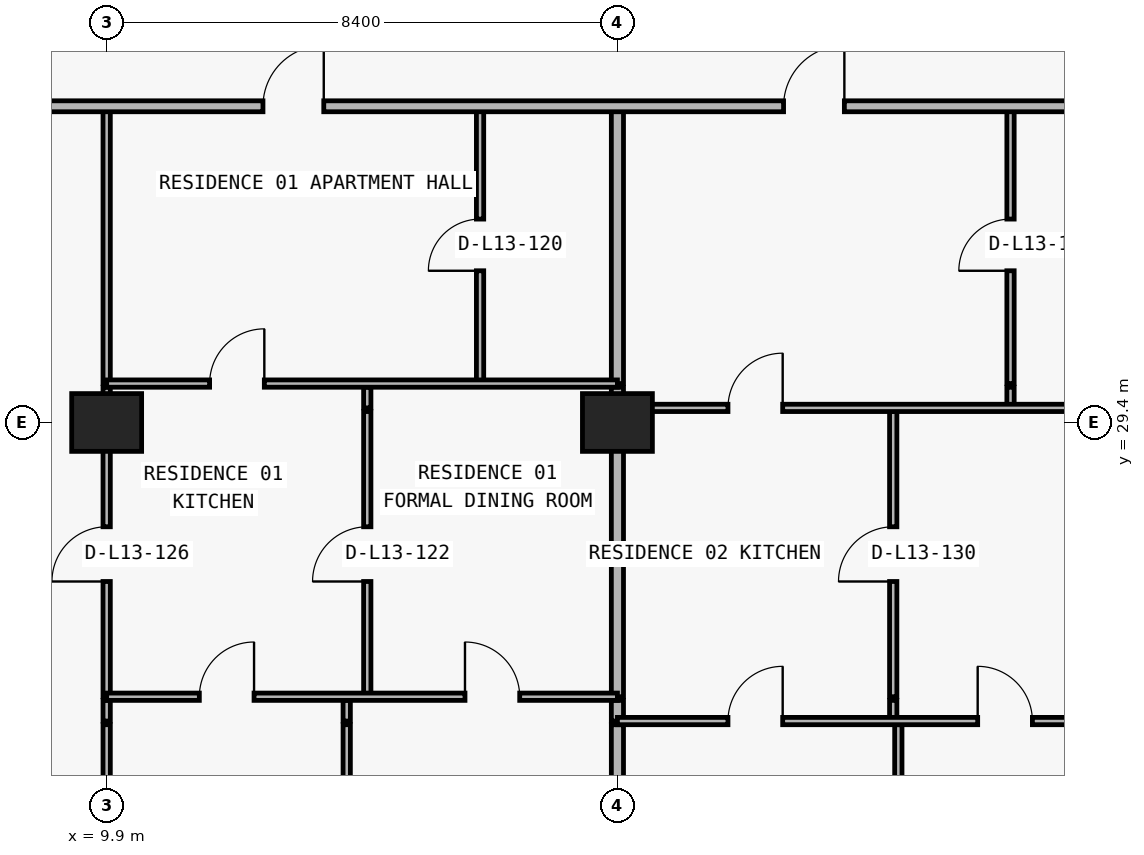
"""IFC4 building model, lengths in metres.
Left out: names, types, materials, properties, quantities, classifications, styles, units other than length and angle.
Written with IfcOpenShell. Run it as: python <this file> out.ifc"""

import sys

from ifc_helpers import new_model, si_unit, direction, frame, frame_2d, origin, origin_2d, place, context, subcontext, project, spatial, rectangle, extrude, element, fill, save


model = new_model("IFC4")
c1 = context("Model", 3, precision=1e-05, world=origin(), true_north=direction((0.0, 1.0)))
c2 = subcontext(c1, "Body", "Model", "MODEL_VIEW")
j1 = project(units=[si_unit("LENGTHUNIT", "METRE"), si_unit("PLANEANGLEUNIT", "RADIAN")], contexts=[c1])
p1 = place(None, origin())
s1 = spatial("IfcSite", under=j1, at=p1, CompositionType="ELEMENT")
p2 = place(p1, origin())
s2 = spatial("IfcBuilding", under=s1, at=p2, CompositionType="ELEMENT")
p3 = place(p2, frame((0.0, 0.0, 53.1)))
s3 = spatial("IfcBuildingStorey", under=s2, at=p3, CompositionType="ELEMENT", Elevation=53.1)
for number, where, z_axis, x_axis in (
    (1, (9.9, 29.4, 0.0), (0.0, 0.0, 1.0), (1.0, 0.0, 0.0)),
    (2, (18.3, 29.4, 0.0), (0.0, 0.0, 1.0), (1.0, 0.0, 0.0)),
):
    element("IfcColumn", number, at=place(p3, frame(where, z_axis=z_axis, x_axis=x_axis)), inside=s3, PredefinedType="COLUMN", context=c2, shape_type="SweptSolid", body=[
        extrude(rectangle(XDim=1.15, YDim=0.95, at=origin_2d()), origin(), (0.0, 0.0, 1.0), 3.05),
    ])
p4 = place(p3, frame((9.9, 6.24, 0.0), z_axis=(0.0, 0.0, 1.0), x_axis=(0.0, 1.0, 0.0)))
e3 = element("IfcWall", 3, at=p4, inside=s3, PredefinedType="PARTITIONING", context=c2, shape_type="SweptSolid", body=[
    extrude(rectangle(XDim=18.19, YDim=0.12, at=frame_2d((9.095, 0.0))), origin(), (0.0, 0.0, 1.0), 2.11),
])
p5 = place(p3, frame((9.9, 24.49, 0.0), z_axis=(0.0, 0.0, 1.0), x_axis=(0.0, 1.0, 0.0)))
e4 = element("IfcWall", 4, at=p5, inside=s3, PredefinedType="PARTITIONING", context=c2, shape_type="SweptSolid", body=[
    extrude(rectangle(XDim=0.34, YDim=0.12, at=frame_2d((0.17, 0.0))), origin(), (0.0, 0.0, 1.0), 2.11),
])
p6 = place(p3, frame((9.9, 24.89, 0.0), z_axis=(0.0, 0.0, 1.0), x_axis=(0.0, 1.0, 0.0)))
e5 = element("IfcWall", 5, at=p6, inside=s3, PredefinedType="PARTITIONING", context=c2, shape_type="SweptSolid", body=[
    extrude(rectangle(XDim=4.69, YDim=0.12, at=frame_2d((2.345, 0.0))), origin(), (0.0, 0.0, 1.0), 2.11),
])
p7 = place(p6, frame((1.895, 0.0, 0.0)))
e6 = element("IfcOpeningElement", 6, at=p7, cuts=e5, PredefinedType="OPENING", context=c2, shape_type="SweptSolid", body=[
    extrude(rectangle(XDim=0.9, YDim=2.06, at=frame_2d((0.45, 1.03))), frame((0.0, 0.07, 0.0), z_axis=(0.0, -1.0, 0.0), x_axis=(1.0, 0.0, 0.0)), (0.0, 0.0, 1.0), 0.14),
])
p8 = place(p3, frame((9.9, 29.64, 0.0), z_axis=(0.0, 0.0, 1.0), x_axis=(0.0, 1.0, 0.0)))
e7 = element("IfcWall", 7, at=p8, inside=s3, PredefinedType="PARTITIONING", context=c2, shape_type="SweptSolid", body=[
    extrude(rectangle(XDim=0.34, YDim=0.12, at=frame_2d((0.17, 0.0))), origin(), (0.0, 0.0, 1.0), 2.11),
])
p9 = place(p3, frame((9.9, 30.04, 0.0), z_axis=(0.0, 0.0, 1.0), x_axis=(0.0, 1.0, 0.0)))
e8 = element("IfcWall", 8, at=p9, inside=s3, PredefinedType="PARTITIONING", context=c2, shape_type="SweptSolid", body=[
    extrude(rectangle(XDim=4.56, YDim=0.12, at=frame_2d((2.28, 0.0))), origin(), (0.0, 0.0, 1.0), 2.11),
])
p10 = place(p3, frame((13.848, 6.24, 0.0), z_axis=(0.0, 0.0, 1.0), x_axis=(0.0, 1.0, 0.0)))
e9 = element("IfcWall", 9, at=p10, inside=s3, PredefinedType="PARTITIONING", context=c2, shape_type="SweptSolid", body=[
    extrude(rectangle(XDim=18.19, YDim=0.12, at=frame_2d((9.095, 0.0))), origin(), (0.0, 0.0, 1.0), 2.423),
])
p11 = place(p3, frame((13.848, 24.49, 0.0), z_axis=(0.0, 0.0, 1.0), x_axis=(0.0, 1.0, 0.0)))
e10 = element("IfcWall", 10, at=p11, inside=s3, PredefinedType="PARTITIONING", context=c2, shape_type="SweptSolid", body=[
    extrude(rectangle(XDim=0.34, YDim=0.12, at=frame_2d((0.17, 0.0))), origin(), (0.0, 0.0, 1.0), 2.423),
])
p12 = place(p3, frame((14.186, 24.89, 0.0), z_axis=(0.0, 0.0, 1.0), x_axis=(0.0, 1.0, 0.0)))
e11 = element("IfcWall", 11, at=p12, inside=s3, PredefinedType="PARTITIONING", context=c2, shape_type="SweptSolid", body=[
    extrude(rectangle(XDim=4.69, YDim=0.12, at=frame_2d((2.345, 0.0))), origin(), (0.0, 0.0, 1.0), 2.423),
])
p13 = place(p12, frame((1.895, 0.0, 0.0)))
e12 = element("IfcOpeningElement", 12, at=p13, cuts=e11, PredefinedType="OPENING", context=c2, shape_type="SweptSolid", body=[
    extrude(rectangle(XDim=0.9, YDim=2.15, at=frame_2d((0.45, 1.075))), frame((0.0, 0.07, 0.0), z_axis=(0.0, -1.0, 0.0), x_axis=(1.0, 0.0, 0.0)), (0.0, 0.0, 1.0), 0.14),
])
p14 = place(p3, frame((14.186, 29.64, 0.0), z_axis=(0.0, 0.0, 1.0), x_axis=(0.0, 1.0, 0.0)))
e13 = element("IfcWall", 13, at=p14, inside=s3, PredefinedType="PARTITIONING", context=c2, shape_type="SweptSolid", body=[
    extrude(rectangle(XDim=0.34, YDim=0.12, at=frame_2d((0.17, 0.0))), origin(), (0.0, 0.0, 1.0), 2.423),
])
p15 = place(p3, frame((16.041, 30.04, 0.0), z_axis=(0.0, 0.0, 1.0), x_axis=(0.0, 1.0, 0.0)))
e14 = element("IfcWall", 14, at=p15, inside=s3, PredefinedType="PARTITIONING", context=c2, shape_type="SweptSolid", body=[
    extrude(rectangle(XDim=4.56, YDim=0.12, at=frame_2d((2.28, 0.0))), origin(), (0.0, 0.0, 1.0), 3.05),
])
p16 = place(p15, frame((1.855, 0.0, 0.0)))
e15 = element("IfcOpeningElement", 15, at=p16, cuts=e14, PredefinedType="OPENING", context=c2, shape_type="SweptSolid", body=[
    extrude(rectangle(XDim=0.85, YDim=2.1, at=frame_2d((0.425, 1.05))), frame((0.0, 0.07, 0.0), z_axis=(0.0, -1.0, 0.0), x_axis=(1.0, 0.0, 0.0)), (0.0, 0.0, 1.0), 0.14),
])
p17 = place(p3, frame((18.3, 6.24, 0.0), z_axis=(0.0, 0.0, 1.0), x_axis=(0.0, 1.0, 0.0)))
e16 = element("IfcWall", 16, at=p17, inside=s3, PredefinedType="PARTITIONING", context=c2, shape_type="SweptSolid", body=[
    extrude(rectangle(XDim=18.19, YDim=0.2, at=frame_2d((9.095, 0.0))), origin(), (0.0, 0.0, 1.0), 2.11),
])
p18 = place(p3, frame((18.3, 24.49, 0.0), z_axis=(0.0, 0.0, 1.0), x_axis=(0.0, 1.0, 0.0)))
e17 = element("IfcWall", 17, at=p18, inside=s3, PredefinedType="PARTITIONING", context=c2, shape_type="SweptSolid", body=[
    extrude(rectangle(XDim=0.34, YDim=0.2, at=frame_2d((0.17, 0.0))), origin(), (0.0, 0.0, 1.0), 2.11),
])
p19 = place(p3, frame((18.3, 24.89, 0.0), z_axis=(0.0, 0.0, 1.0), x_axis=(0.0, 1.0, 0.0)))
e18 = element("IfcWall", 18, at=p19, inside=s3, PredefinedType="PARTITIONING", context=c2, shape_type="SweptSolid", body=[
    extrude(rectangle(XDim=4.69, YDim=0.2, at=frame_2d((2.345, 0.0))), origin(), (0.0, 0.0, 1.0), 2.11),
])
p20 = place(p3, frame((18.3, 29.64, 0.0), z_axis=(0.0, 0.0, 1.0), x_axis=(0.0, 1.0, 0.0)))
e19 = element("IfcWall", 19, at=p20, inside=s3, PredefinedType="PARTITIONING", context=c2, shape_type="SweptSolid", body=[
    extrude(rectangle(XDim=0.34, YDim=0.2, at=frame_2d((0.17, 0.0))), origin(), (0.0, 0.0, 1.0), 2.11),
])
p21 = place(p3, frame((18.3, 30.04, 0.0), z_axis=(0.0, 0.0, 1.0), x_axis=(0.0, 1.0, 0.0)))
e20 = element("IfcWall", 20, at=p21, inside=s3, PredefinedType="PARTITIONING", context=c2, shape_type="SweptSolid", body=[
    extrude(rectangle(XDim=4.56, YDim=0.2, at=frame_2d((2.28, 0.0))), origin(), (0.0, 0.0, 1.0), 2.11),
])
p22 = place(p3, frame((22.836, 24.49, 0.0), z_axis=(0.0, 0.0, 1.0), x_axis=(0.0, 1.0, 0.0)))
e21 = element("IfcWall", 21, at=p22, inside=s3, PredefinedType="PARTITIONING", context=c2, shape_type="SweptSolid", body=[
    extrude(rectangle(XDim=0.34, YDim=0.12, at=frame_2d((0.17, 0.0))), origin(), (0.0, 0.0, 1.0), 3.05),
])
p23 = place(p3, frame((22.836, 24.89, 0.0), z_axis=(0.0, 0.0, 1.0), x_axis=(0.0, 1.0, 0.0)))
e22 = element("IfcWall", 22, at=p23, inside=s3, PredefinedType="PARTITIONING", context=c2, shape_type="SweptSolid", body=[
    extrude(rectangle(XDim=4.69, YDim=0.12, at=frame_2d((2.345, 0.0))), origin(), (0.0, 0.0, 1.0), 3.05),
])
p24 = place(p23, frame((1.895, 0.0, 0.0)))
e23 = element("IfcOpeningElement", 23, at=p24, cuts=e22, PredefinedType="OPENING", context=c2, shape_type="SweptSolid", body=[
    extrude(rectangle(XDim=0.9, YDim=2.15, at=frame_2d((0.45, 1.075))), frame((0.0, 0.07, 0.0), z_axis=(0.0, -1.0, 0.0), x_axis=(1.0, 0.0, 0.0)), (0.0, 0.0, 1.0), 0.14),
])
p25 = place(p3, frame((22.92, 6.24, 0.0), z_axis=(0.0, 0.0, 1.0), x_axis=(0.0, 1.0, 0.0)))
e24 = element("IfcWall", 24, at=p25, inside=s3, PredefinedType="PARTITIONING", context=c2, shape_type="SweptSolid", body=[
    extrude(rectangle(XDim=18.19, YDim=0.12, at=frame_2d((9.095, 0.0))), origin(), (0.0, 0.0, 1.0), 3.05),
])
p26 = place(p3, frame((24.765, 29.64, 0.0), z_axis=(0.0, 0.0, 1.0), x_axis=(0.0, 1.0, 0.0)))
e25 = element("IfcWall", 25, at=p26, inside=s3, PredefinedType="PARTITIONING", context=c2, shape_type="SweptSolid", body=[
    extrude(rectangle(XDim=0.34, YDim=0.12, at=frame_2d((0.17, 0.0))), origin(), (0.0, 0.0, 1.0), 3.05),
])
p27 = place(p3, frame((24.765, 30.04, 0.0), z_axis=(0.0, 0.0, 1.0), x_axis=(0.0, 1.0, 0.0)))
e26 = element("IfcWall", 26, at=p27, inside=s3, PredefinedType="PARTITIONING", context=c2, shape_type="SweptSolid", body=[
    extrude(rectangle(XDim=4.56, YDim=0.12, at=frame_2d((2.28, 0.0))), origin(), (0.0, 0.0, 1.0), 3.05),
])
p28 = place(p27, frame((1.855, 0.0, 0.0)))
e27 = element("IfcOpeningElement", 27, at=p28, cuts=e26, PredefinedType="OPENING", context=c2, shape_type="SweptSolid", body=[
    extrude(rectangle(XDim=0.85, YDim=2.1, at=frame_2d((0.425, 1.05))), frame((0.0, 0.07, 0.0), z_axis=(0.0, -1.0, 0.0), x_axis=(1.0, 0.0, 0.0)), (0.0, 0.0, 1.0), 0.14),
])
p29 = place(p3, frame((18.3, 24.49, 0.0), z_axis=(0.0, 0.0, 1.0), x_axis=(1.0, 0.0, 0.0)))
e28 = element("IfcWall", 28, at=p29, inside=s3, PredefinedType="PARTITIONING", context=c2, shape_type="SweptSolid", body=[
    extrude(rectangle(XDim=8.13, YDim=0.12, at=frame_2d((4.065, 0.0))), origin(), (0.0, 0.0, 1.0), 3.05),
])
p30 = place(p29, frame((1.818, 0.0, 0.0)))
e29 = element("IfcOpeningElement", 29, at=p30, cuts=e28, PredefinedType="OPENING", context=c2, shape_type="SweptSolid", body=[
    extrude(rectangle(XDim=0.9, YDim=2.15, at=frame_2d((0.45, 1.075))), frame((0.0, 0.07, 0.0), z_axis=(0.0, -1.0, 0.0), x_axis=(1.0, 0.0, 0.0)), (0.0, 0.0, 1.0), 0.14),
])
p31 = place(p29, frame((5.925, 0.0, 0.0)))
e30 = element("IfcOpeningElement", 30, at=p31, cuts=e28, PredefinedType="OPENING", context=c2, shape_type="SweptSolid", body=[
    extrude(rectangle(XDim=0.9, YDim=2.15, at=frame_2d((0.45, 1.075))), frame((0.0, 0.07, 0.0), z_axis=(0.0, -1.0, 0.0), x_axis=(1.0, 0.0, 0.0)), (0.0, 0.0, 1.0), 0.14),
])
p32 = place(p3, frame((9.9, 24.89, 0.0), z_axis=(0.0, 0.0, 1.0), x_axis=(1.0, 0.0, 0.0)))
e31 = element("IfcWall", 31, at=p32, inside=s3, PredefinedType="PARTITIONING", context=c2, shape_type="SweptSolid", body=[
    extrude(rectangle(XDim=8.4, YDim=0.12, at=frame_2d((4.2, 0.0))), origin(), (0.0, 0.0, 1.0), 3.05),
])
p33 = place(p32, frame((1.524, 0.0, 0.0)))
e32 = element("IfcOpeningElement", 32, at=p33, cuts=e31, PredefinedType="OPENING", context=c2, shape_type="SweptSolid", body=[
    extrude(rectangle(XDim=0.9, YDim=2.15, at=frame_2d((0.45, 1.075))), frame((0.0, 0.07, 0.0), z_axis=(0.0, -1.0, 0.0), x_axis=(1.0, 0.0, 0.0)), (0.0, 0.0, 1.0), 0.14),
])
p34 = place(p32, frame((5.893, 0.0, 0.0)))
e33 = element("IfcOpeningElement", 33, at=p34, cuts=e31, PredefinedType="OPENING", context=c2, shape_type="SweptSolid", body=[
    extrude(rectangle(XDim=0.9, YDim=2.15, at=frame_2d((0.45, 1.075))), frame((0.0, 0.07, 0.0), z_axis=(0.0, -1.0, 0.0), x_axis=(1.0, 0.0, 0.0)), (0.0, 0.0, 1.0), 0.14),
])
p35 = place(p3, frame((18.3, 29.64, 0.0), z_axis=(0.0, 0.0, 1.0), x_axis=(1.0, 0.0, 0.0)))
e34 = element("IfcWall", 34, at=p35, inside=s3, PredefinedType="PARTITIONING", context=c2, shape_type="SweptSolid", body=[
    extrude(rectangle(XDim=8.4, YDim=0.12, at=frame_2d((4.2, 0.0))), origin(), (0.0, 0.0, 1.0), 2.11),
])
p36 = place(p35, frame((1.818, 0.0, 0.0)))
e35 = element("IfcOpeningElement", 35, at=p36, cuts=e34, PredefinedType="OPENING", context=c2, shape_type="SweptSolid", body=[
    extrude(rectangle(XDim=0.9, YDim=2.06, at=frame_2d((0.45, 1.03))), frame((0.0, 0.07, 0.0), z_axis=(0.0, -1.0, 0.0), x_axis=(1.0, 0.0, 0.0)), (0.0, 0.0, 1.0), 0.14),
])
p37 = place(p3, frame((9.9, 30.04, 0.0), z_axis=(0.0, 0.0, 1.0), x_axis=(1.0, 0.0, 0.0)))
e36 = element("IfcWall", 36, at=p37, inside=s3, PredefinedType="PARTITIONING", context=c2, shape_type="SweptSolid", body=[
    extrude(rectangle(XDim=8.4, YDim=0.12, at=frame_2d((4.2, 0.0))), origin(), (0.0, 0.0, 1.0), 3.05),
])
p38 = place(p37, frame((1.693, 0.0, 0.0)))
e37 = element("IfcOpeningElement", 37, at=p38, cuts=e36, PredefinedType="OPENING", context=c2, shape_type="SweptSolid", body=[
    extrude(rectangle(XDim=0.9, YDim=2.15, at=frame_2d((0.45, 1.075))), frame((0.0, 0.07, 0.0), z_axis=(0.0, -1.0, 0.0), x_axis=(1.0, 0.0, 0.0)), (0.0, 0.0, 1.0), 0.14),
])
p39 = place(p3, frame((5.105, 34.6, 0.0), z_axis=(0.0, 0.0, 1.0), x_axis=(1.0, 0.0, 0.0)))
e38 = element("IfcWall", 38, at=p39, inside=s3, PredefinedType="PARTITIONING", context=c2, shape_type="SweptSolid", body=[
    extrude(rectangle(XDim=67.595, YDim=0.18, at=frame_2d((33.797, 0.0))), origin(), (0.0, 0.0, 1.0), 3.05),
])
p40 = place(p39, frame((7.365, 0.0, 0.0)))
e39 = element("IfcOpeningElement", 39, at=p40, cuts=e38, PredefinedType="OPENING", context=c2, shape_type="SweptSolid", body=[
    extrude(rectangle(XDim=1.0, YDim=2.2, at=frame_2d((0.5, 1.1))), frame((0.0, 0.1, 0.0), z_axis=(0.0, -1.0, 0.0), x_axis=(1.0, 0.0, 0.0)), (0.0, 0.0, 1.0), 0.2),
])
p41 = place(p39, frame((15.927, 0.0, 0.0)))
e40 = element("IfcOpeningElement", 40, at=p41, cuts=e38, PredefinedType="OPENING", context=c2, shape_type="SweptSolid", body=[
    extrude(rectangle(XDim=1.0, YDim=2.2, at=frame_2d((0.5, 1.1))), frame((0.0, 0.1, 0.0), z_axis=(0.0, -1.0, 0.0), x_axis=(1.0, 0.0, 0.0)), (0.0, 0.0, 1.0), 0.2),
])
p42 = place(p39, frame((24.407, 0.0, 0.0)))
e41 = element("IfcOpeningElement", 41, at=p42, cuts=e38, PredefinedType="OPENING", context=c2, shape_type="SweptSolid", body=[
    extrude(rectangle(XDim=1.0, YDim=2.2, at=frame_2d((0.5, 1.1))), frame((0.0, 0.1, 0.0), z_axis=(0.0, -1.0, 0.0), x_axis=(1.0, 0.0, 0.0)), (0.0, 0.0, 1.0), 0.2),
])
p43 = place(p39, frame((48.739, 0.0, 0.0)))
e42 = element("IfcOpeningElement", 42, at=p43, cuts=e38, PredefinedType="OPENING", context=c2, shape_type="SweptSolid", body=[
    extrude(rectangle(XDim=1.0, YDim=2.2, at=frame_2d((0.5, 1.1))), frame((0.0, 0.1, 0.0), z_axis=(0.0, -1.0, 0.0), x_axis=(1.0, 0.0, 0.0)), (0.0, 0.0, 1.0), 0.2),
])
p44 = place(p39, frame((56.98, 0.0, 0.0)))
e43 = element("IfcOpeningElement", 43, at=p44, cuts=e38, PredefinedType="OPENING", context=c2, shape_type="SweptSolid", body=[
    extrude(rectangle(XDim=1.0, YDim=2.2, at=frame_2d((0.5, 1.1))), frame((0.0, 0.1, 0.0), z_axis=(0.0, -1.0, 0.0), x_axis=(1.0, 0.0, 0.0)), (0.0, 0.0, 1.0), 0.2),
])
p45 = place(p40, origin())
e44 = element("IfcDoor", 44, at=p45, inside=s3, OperationType="SINGLE_SWING_RIGHT", PredefinedType="DOOR", context=c2, shape_type="SweptSolid", body=[
    extrude(rectangle(XDim=1.0, YDim=2.2, at=frame_2d((0.5, 1.1))), frame((0.0, 0.025, 0.0), z_axis=(0.0, -1.0, 0.0), x_axis=(1.0, 0.0, 0.0)), (0.0, 0.0, 1.0), 0.05),
])
fill(e39, e44)
p46 = place(p16, origin())
e45 = element("IfcDoor", 45, at=p46, inside=s3, OperationType="SINGLE_SWING_LEFT", PredefinedType="DOOR", context=c2, shape_type="SweptSolid", body=[
    extrude(rectangle(XDim=0.85, YDim=2.1, at=frame_2d((0.425, 1.05))), frame((0.0, 0.025, 0.0), z_axis=(0.0, -1.0, 0.0), x_axis=(1.0, 0.0, 0.0)), (0.0, 0.0, 1.0), 0.05),
])
fill(e15, e45)
p47 = place(p38, origin())
e46 = element("IfcDoor", 46, at=p47, inside=s3, OperationType="SINGLE_SWING_RIGHT", PredefinedType="DOOR", context=c2, shape_type="SweptSolid", body=[
    extrude(rectangle(XDim=0.9, YDim=2.15, at=frame_2d((0.45, 1.075))), frame((0.0, 0.025, 0.0), z_axis=(0.0, -1.0, 0.0), x_axis=(1.0, 0.0, 0.0)), (0.0, 0.0, 1.0), 0.05),
])
fill(e37, e46)
p48 = place(p13, origin())
e47 = element("IfcDoor", 47, at=p48, inside=s3, OperationType="SINGLE_SWING_LEFT", PredefinedType="DOOR", context=c2, shape_type="SweptSolid", body=[
    extrude(rectangle(XDim=0.9, YDim=2.15, at=frame_2d((0.45, 1.075))), frame((0.0, 0.025, 0.0), z_axis=(0.0, -1.0, 0.0), x_axis=(1.0, 0.0, 0.0)), (0.0, 0.0, 1.0), 0.05),
])
fill(e12, e47)
p49 = place(p33, origin())
e48 = element("IfcDoor", 48, at=p49, inside=s3, OperationType="SINGLE_SWING_RIGHT", PredefinedType="DOOR", context=c2, shape_type="SweptSolid", body=[
    extrude(rectangle(XDim=0.9, YDim=2.15, at=frame_2d((0.45, 1.075))), frame((0.0, 0.025, 0.0), z_axis=(0.0, -1.0, 0.0), x_axis=(1.0, 0.0, 0.0)), (0.0, 0.0, 1.0), 0.05),
])
fill(e32, e48)
p50 = place(p34, origin())
e49 = element("IfcDoor", 49, at=p50, inside=s3, OperationType="SINGLE_SWING_LEFT", PredefinedType="DOOR", context=c2, shape_type="SweptSolid", body=[
    extrude(rectangle(XDim=0.9, YDim=2.15, at=frame_2d((0.45, 1.075))), frame((0.0, 0.025, 0.0), z_axis=(0.0, -1.0, 0.0), x_axis=(1.0, 0.0, 0.0)), (0.0, 0.0, 1.0), 0.05),
])
fill(e33, e49)
p51 = place(p7, origin())
e50 = element("IfcDoor", 50, at=p51, inside=s3, OperationType="SINGLE_SWING_LEFT", PredefinedType="DOOR", context=c2, shape_type="SweptSolid", body=[
    extrude(rectangle(XDim=0.9, YDim=2.06, at=frame_2d((0.45, 1.03))), frame((0.0, 0.025, 0.0), z_axis=(0.0, -1.0, 0.0), x_axis=(1.0, 0.0, 0.0)), (0.0, 0.0, 1.0), 0.05),
])
fill(e6, e50)
p52 = place(p41, origin())
e51 = element("IfcDoor", 51, at=p52, inside=s3, OperationType="SINGLE_SWING_RIGHT", PredefinedType="DOOR", context=c2, shape_type="SweptSolid", body=[
    extrude(rectangle(XDim=1.0, YDim=2.2, at=frame_2d((0.5, 1.1))), frame((0.0, 0.025, 0.0), z_axis=(0.0, -1.0, 0.0), x_axis=(1.0, 0.0, 0.0)), (0.0, 0.0, 1.0), 0.05),
])
fill(e40, e51)
p53 = place(p28, origin())
e52 = element("IfcDoor", 52, at=p53, inside=s3, OperationType="SINGLE_SWING_LEFT", PredefinedType="DOOR", context=c2, shape_type="SweptSolid", body=[
    extrude(rectangle(XDim=0.85, YDim=2.1, at=frame_2d((0.425, 1.05))), frame((0.0, 0.025, 0.0), z_axis=(0.0, -1.0, 0.0), x_axis=(1.0, 0.0, 0.0)), (0.0, 0.0, 1.0), 0.05),
])
fill(e27, e52)
p54 = place(p36, origin())
e53 = element("IfcDoor", 53, at=p54, inside=s3, OperationType="SINGLE_SWING_RIGHT", PredefinedType="DOOR", context=c2, shape_type="SweptSolid", body=[
    extrude(rectangle(XDim=0.9, YDim=2.06, at=frame_2d((0.45, 1.03))), frame((0.0, 0.025, 0.0), z_axis=(0.0, -1.0, 0.0), x_axis=(1.0, 0.0, 0.0)), (0.0, 0.0, 1.0), 0.05),
])
fill(e35, e53)
p55 = place(p24, origin())
e54 = element("IfcDoor", 54, at=p55, inside=s3, OperationType="SINGLE_SWING_LEFT", PredefinedType="DOOR", context=c2, shape_type="SweptSolid", body=[
    extrude(rectangle(XDim=0.9, YDim=2.15, at=frame_2d((0.45, 1.075))), frame((0.0, 0.025, 0.0), z_axis=(0.0, -1.0, 0.0), x_axis=(1.0, 0.0, 0.0)), (0.0, 0.0, 1.0), 0.05),
])
fill(e23, e54)
p56 = place(p30, origin())
e55 = element("IfcDoor", 55, at=p56, inside=s3, OperationType="SINGLE_SWING_RIGHT", PredefinedType="DOOR", context=c2, shape_type="SweptSolid", body=[
    extrude(rectangle(XDim=0.9, YDim=2.15, at=frame_2d((0.45, 1.075))), frame((0.0, 0.025, 0.0), z_axis=(0.0, -1.0, 0.0), x_axis=(1.0, 0.0, 0.0)), (0.0, 0.0, 1.0), 0.05),
])
fill(e29, e55)
p57 = place(p31, origin())
e56 = element("IfcDoor", 56, at=p57, inside=s3, OperationType="SINGLE_SWING_LEFT", PredefinedType="DOOR", context=c2, shape_type="SweptSolid", body=[
    extrude(rectangle(XDim=0.9, YDim=2.15, at=frame_2d((0.45, 1.075))), frame((0.0, 0.025, 0.0), z_axis=(0.0, -1.0, 0.0), x_axis=(1.0, 0.0, 0.0)), (0.0, 0.0, 1.0), 0.05),
])
fill(e30, e56)
save(model, sys.argv[1])
